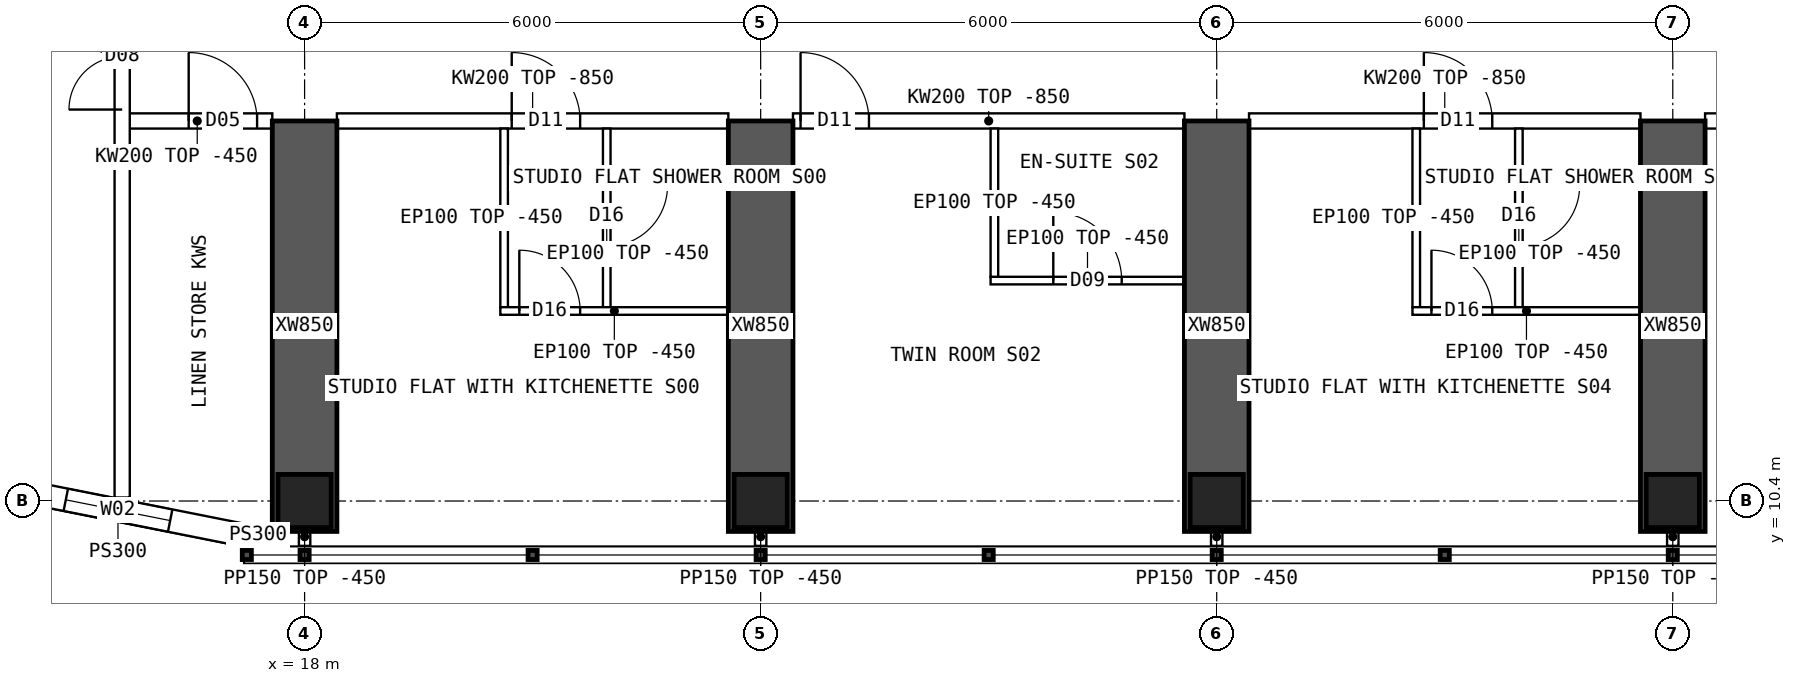
"""IFC4 building model, lengths in metres.
Left out: names, types, materials, properties, quantities, classifications, styles, units other than length and angle.
Written with IfcOpenShell. Run it as: python <this file> out.ifc"""

import sys

from ifc_helpers import new_model, si_unit, direction, frame, frame_2d, origin, origin_2d, place, context, subcontext, project, spatial, polyline, rectangle, hollow_rectangle, outline, extrude, element, fill, save


model = new_model("IFC4")
c1 = context("Model", 3, precision=1e-05, world=origin(), true_north=direction((0.0, 1.0)))
c2 = subcontext(c1, "Body", "Model", "MODEL_VIEW")
j1 = project(units=[si_unit("LENGTHUNIT", "METRE"), si_unit("PLANEANGLEUNIT", "RADIAN")], contexts=[c1])
p1 = place(None, origin())
s1 = spatial("IfcSite", under=j1, at=p1, CompositionType="ELEMENT")
p2 = place(p1, origin())
s2 = spatial("IfcBuilding", under=s1, at=p2, CompositionType="ELEMENT")
p3 = place(p2, frame((0.0, 0.0, 159.85)))
s3 = spatial("IfcBuildingStorey", under=s2, at=p3, CompositionType="ELEMENT", Elevation=159.85)
for number, where, z_axis, x_axis in (
    (1, (18.0, 10.4, 0.0), (0.0, 0.0, 1.0), (1.0, 0.0, 0.0)),
    (2, (24.0, 10.4, 0.0), (0.0, 0.0, 1.0), (1.0, 0.0, 0.0)),
    (3, (30.0, 10.4, 0.0), (0.0, 0.0, 1.0), (1.0, 0.0, 0.0)),
    (4, (36.0, 10.4, 0.0), (0.0, 0.0, 1.0), (1.0, 0.0, 0.0)),
):
    element("IfcColumn", number, at=place(p3, frame(where, z_axis=z_axis, x_axis=x_axis)), inside=s3, PredefinedType="COLUMN", context=c2, shape_type="SweptSolid", body=[
        extrude(hollow_rectangle(XDim=0.7, YDim=0.7, WallThickness=0.07, at=origin_2d()), origin(), (0.0, 0.0, 1.0), 3.75),
    ])
for number, where, z_axis, x_axis in (
    (5, (18.0, 10.0, 0.0), (0.0, 0.0, 1.0), (0.0, 1.0, 0.0)),
    (6, (24.0, 10.0, 0.0), (0.0, 0.0, 1.0), (0.0, 1.0, 0.0)),
    (7, (30.0, 10.0, 0.0), (0.0, 0.0, 1.0), (0.0, 1.0, 0.0)),
    (8, (36.0, 10.0, 0.0), (0.0, 0.0, 1.0), (0.0, 1.0, 0.0)),
):
    element("IfcWall", number, at=place(p3, frame(where, z_axis=z_axis, x_axis=x_axis)), inside=s3, PredefinedType="SHEAR", context=c2, shape_type="SweptSolid", body=[
        extrude(rectangle(XDim=5.4, YDim=0.85, at=frame_2d((2.7, 0.0))), origin(), (0.0, 0.0, 1.0), 3.75),
    ])
p4 = place(p3, frame((13.89, 10.608, 0.0), z_axis=(0.0, 0.0, 1.0), x_axis=(0.98078325777, -0.195100490205, 0.0)))
e9 = element("IfcWall", 9, at=p4, inside=s3, PredefinedType="SOLIDWALL", context=c2, shape_type="SweptSolid", body=[
    extrude(outline(polyline([(-0.03, -0.15), (3.405, -0.15), (3.345, 0.15), (0.03, 0.15), (-0.03, -0.15)])), origin(), (0.0, 0.0, 1.0), 3.3),
])
p5 = place(p4, frame((0.988, 0.0, 0.9)))
e10 = element("IfcOpeningElement", 10, at=p5, cuts=e9, PredefinedType="OPENING", context=c2, shape_type="SweptSolid", body=[
    extrude(rectangle(XDim=1.4, YDim=1.8, at=frame_2d((0.7, 0.9))), frame((0.0, 0.16, 0.0), z_axis=(0.0, -1.0, 0.0), x_axis=(1.0, 0.0, 0.0)), (0.0, 0.0, 1.0), 0.32),
])
p6 = place(p3, frame((17.2, 9.95, 0.0), z_axis=(0.0, 0.0, 1.0), x_axis=(1.0, 0.0, 0.0)))
e11 = element("IfcWall", 11, at=p6, inside=s3, PredefinedType="SOLIDWALL", context=c2, shape_type="SweptSolid", body=[
    extrude(rectangle(XDim=0.375, YDim=0.3, at=frame_2d((0.188, 0.0))), origin(), (0.0, 0.0, 1.0), 3.3),
])
p7 = place(p3, frame((15.6, 15.4, 0.0), z_axis=(0.0, 0.0, 1.0), x_axis=(1.0, 0.0, 0.0)))
e12 = element("IfcWall", 12, at=p7, inside=s3, PredefinedType="SOLIDWALL", context=c2, shape_type="SweptSolid", body=[
    extrude(rectangle(XDim=1.975, YDim=0.2, at=frame_2d((0.987, 0.0))), origin(), (0.0, 0.0, 1.0), 3.3),
])
p8 = place(p7, frame((0.875, 0.0, 0.0)))
e13 = element("IfcOpeningElement", 13, at=p8, cuts=e12, PredefinedType="OPENING", context=c2, shape_type="SweptSolid", body=[
    extrude(rectangle(XDim=0.9, YDim=2.1, at=frame_2d((0.45, 1.05))), frame((0.0, 0.11, 0.0), z_axis=(0.0, -1.0, 0.0), x_axis=(1.0, 0.0, 0.0)), (0.0, 0.0, 1.0), 0.22),
])
p9 = place(p3, frame((18.425, 15.4, 0.0), z_axis=(0.0, 0.0, 1.0), x_axis=(1.0, 0.0, 0.0)))
e14 = element("IfcWall", 14, at=p9, inside=s3, PredefinedType="SOLIDWALL", context=c2, shape_type="SweptSolid", body=[
    extrude(outline(polyline([(0.0, 0.0), (5.15, 0.0), (5.15, 2.9), (0.0, 2.9), (0.0, 0.0)])), frame((0.0, 0.1, 0.0), z_axis=(0.0, -1.0, 0.0), x_axis=(1.0, 0.0, 0.0)), (0.0, 0.0, 1.0), 0.2),
])
p10 = place(p9, frame((2.3, 0.0, 0.0)))
e15 = element("IfcOpeningElement", 15, at=p10, cuts=e14, PredefinedType="OPENING", context=c2, shape_type="SweptSolid", body=[
    extrude(rectangle(XDim=0.9, YDim=2.1, at=frame_2d((0.45, 1.05))), frame((0.0, 0.11, 0.0), z_axis=(0.0, -1.0, 0.0), x_axis=(1.0, 0.0, 0.0)), (0.0, 0.0, 1.0), 0.22),
])
p11 = place(p3, frame((24.425, 15.4, 0.0), z_axis=(0.0, 0.0, 1.0), x_axis=(1.0, 0.0, 0.0)))
e16 = element("IfcWall", 16, at=p11, inside=s3, PredefinedType="SOLIDWALL", context=c2, shape_type="SweptSolid", body=[
    extrude(outline(polyline([(0.0, 0.0), (5.15, 0.0), (5.15, 2.9), (0.0, 2.9), (0.0, 0.0)])), frame((0.0, 0.1, 0.0), z_axis=(0.0, -1.0, 0.0), x_axis=(1.0, 0.0, 0.0)), (0.0, 0.0, 1.0), 0.2),
])
p12 = place(p11, frame((0.1, 0.0, 0.0)))
e17 = element("IfcOpeningElement", 17, at=p12, cuts=e16, PredefinedType="OPENING", context=c2, shape_type="SweptSolid", body=[
    extrude(rectangle(XDim=0.9, YDim=2.1, at=frame_2d((0.45, 1.05))), frame((0.0, 0.11, 0.0), z_axis=(0.0, -1.0, 0.0), x_axis=(1.0, 0.0, 0.0)), (0.0, 0.0, 1.0), 0.22),
])
p13 = place(p3, frame((30.425, 15.4, 0.0), z_axis=(0.0, 0.0, 1.0), x_axis=(1.0, 0.0, 0.0)))
e18 = element("IfcWall", 18, at=p13, inside=s3, PredefinedType="SOLIDWALL", context=c2, shape_type="SweptSolid", body=[
    extrude(outline(polyline([(0.0, 0.0), (5.15, 0.0), (5.15, 2.9), (0.0, 2.9), (0.0, 0.0)])), frame((0.0, 0.1, 0.0), z_axis=(0.0, -1.0, 0.0), x_axis=(1.0, 0.0, 0.0)), (0.0, 0.0, 1.0), 0.2),
])
p14 = place(p13, frame((2.3, 0.0, 0.0)))
e19 = element("IfcOpeningElement", 19, at=p14, cuts=e18, PredefinedType="OPENING", context=c2, shape_type="SweptSolid", body=[
    extrude(rectangle(XDim=0.9, YDim=2.1, at=frame_2d((0.45, 1.05))), frame((0.0, 0.11, 0.0), z_axis=(0.0, -1.0, 0.0), x_axis=(1.0, 0.0, 0.0)), (0.0, 0.0, 1.0), 0.22),
])
p15 = place(p3, frame((36.425, 15.4, 0.0), z_axis=(0.0, 0.0, 1.0), x_axis=(1.0, 0.0, 0.0)))
e20 = element("IfcWall", 20, at=p15, inside=s3, PredefinedType="SOLIDWALL", context=c2, shape_type="SweptSolid", body=[
    extrude(outline(polyline([(0.0, 0.0), (5.15, 0.0), (5.15, 2.9), (0.0, 2.9), (0.0, 0.0)])), frame((0.0, 0.1, 0.0), z_axis=(0.0, -1.0, 0.0), x_axis=(1.0, 0.0, 0.0)), (0.0, 0.0, 1.0), 0.2),
])
p16 = place(p15, frame((0.3, 0.0, 0.0)))
e21 = element("IfcOpeningElement", 21, at=p16, cuts=e20, PredefinedType="OPENING", context=c2, shape_type="SweptSolid", body=[
    extrude(rectangle(XDim=1.0, YDim=2.1, at=frame_2d((0.5, 1.05))), frame((0.0, 0.11, 0.0), z_axis=(0.0, -1.0, 0.0), x_axis=(1.0, 0.0, 0.0)), (0.0, 0.0, 1.0), 0.22),
])
p17 = place(p3, frame((23.575, 12.9, 0.0), z_axis=(0.0, 0.0, 1.0), x_axis=(-1.0, 0.0, 0.0)))
e22 = element("IfcWall", 22, at=p17, inside=s3, PredefinedType="PARTITIONING", context=c2, shape_type="SweptSolid", body=[
    extrude(rectangle(XDim=3.0, YDim=0.1, at=frame_2d((1.5, 0.0))), origin(), (0.0, 0.0, 1.0), 3.3),
])
p18 = place(p17, frame((1.95, 0.0, 0.0)))
e23 = element("IfcOpeningElement", 23, at=p18, cuts=e22, PredefinedType="OPENING", context=c2, shape_type="SweptSolid", body=[
    extrude(rectangle(XDim=0.8, YDim=2.1, at=frame_2d((0.4, 1.05))), frame((0.0, 0.06, 0.0), z_axis=(0.0, -1.0, 0.0), x_axis=(1.0, 0.0, 0.0)), (0.0, 0.0, 1.0), 0.12),
])
p19 = place(p3, frame((20.625, 12.95, 0.0), z_axis=(0.0, 0.0, 1.0), x_axis=(0.0, 1.0, 0.0)))
e24 = element("IfcWall", 24, at=p19, inside=s3, PredefinedType="PARTITIONING", context=c2, shape_type="SweptSolid", body=[
    extrude(outline(polyline([(0.0, 0.0), (2.35, 0.0), (2.35, 2.9), (2.302, 2.9), (2.3, 3.3), (0.0, 3.3), (0.0, 0.0)])), frame((0.0, 0.05, 0.0), z_axis=(0.0, -1.0, 0.0), x_axis=(1.0, 0.0, 0.0)), (0.0, 0.0, 1.0), 0.1),
])
p20 = place(p3, frame((21.975, 12.95, 0.0), z_axis=(0.0, 0.0, 1.0), x_axis=(0.0, 1.0, 0.0)))
e25 = element("IfcWall", 25, at=p20, inside=s3, PredefinedType="PARTITIONING", context=c2, shape_type="SweptSolid", body=[
    extrude(outline(polyline([(0.0, 0.0), (2.35, 0.0), (2.35, 2.9), (2.302, 2.9), (2.3, 3.3), (0.0, 3.3), (0.0, 0.0)])), frame((0.0, 0.05, 0.0), z_axis=(0.0, -1.0, 0.0), x_axis=(1.0, 0.0, 0.0)), (0.0, 0.0, 1.0), 0.1),
])
p21 = place(p20, frame((0.8, 0.0, 0.0)))
e26 = element("IfcOpeningElement", 26, at=p21, cuts=e25, PredefinedType="OPENING", context=c2, shape_type="SweptSolid", body=[
    extrude(rectangle(XDim=0.8, YDim=2.1, at=frame_2d((0.4, 1.05))), frame((0.0, 0.06, 0.0), z_axis=(0.0, -1.0, 0.0), x_axis=(1.0, 0.0, 0.0)), (0.0, 0.0, 1.0), 0.12),
])
p22 = place(p3, frame((29.575, 13.3, 0.0), z_axis=(0.0, 0.0, 1.0), x_axis=(-1.0, 0.0, 0.0)))
e27 = element("IfcWall", 27, at=p22, inside=s3, PredefinedType="PARTITIONING", context=c2, shape_type="SweptSolid", body=[
    extrude(rectangle(XDim=2.55, YDim=0.1, at=frame_2d((1.275, 0.0))), origin(), (0.0, 0.0, 1.0), 3.3),
])
p23 = place(p22, frame((0.825, 0.0, 0.0)))
e28 = element("IfcOpeningElement", 28, at=p23, cuts=e27, PredefinedType="OPENING", context=c2, shape_type="SweptSolid", body=[
    extrude(rectangle(XDim=0.9, YDim=2.1, at=frame_2d((0.45, 1.05))), frame((0.0, 0.06, 0.0), z_axis=(0.0, -1.0, 0.0), x_axis=(1.0, 0.0, 0.0)), (0.0, 0.0, 1.0), 0.12),
])
p24 = place(p3, frame((27.075, 13.35, 0.0), z_axis=(0.0, 0.0, 1.0), x_axis=(0.0, 1.0, 0.0)))
e29 = element("IfcWall", 29, at=p24, inside=s3, PredefinedType="PARTITIONING", context=c2, shape_type="SweptSolid", body=[
    extrude(outline(polyline([(0.0, 0.0), (1.95, 0.0), (1.95, 2.9), (1.902, 2.9), (1.9, 3.3), (0.0, 3.3), (0.0, 0.0)])), frame((0.0, 0.05, 0.0), z_axis=(0.0, -1.0, 0.0), x_axis=(1.0, 0.0, 0.0)), (0.0, 0.0, 1.0), 0.1),
])
p25 = place(p3, frame((35.575, 12.9, 0.0), z_axis=(0.0, 0.0, 1.0), x_axis=(-1.0, 0.0, 0.0)))
e30 = element("IfcWall", 30, at=p25, inside=s3, PredefinedType="PARTITIONING", context=c2, shape_type="SweptSolid", body=[
    extrude(rectangle(XDim=3.0, YDim=0.1, at=frame_2d((1.5, 0.0))), origin(), (0.0, 0.0, 1.0), 3.3),
])
p26 = place(p25, frame((1.95, 0.0, 0.0)))
e31 = element("IfcOpeningElement", 31, at=p26, cuts=e30, PredefinedType="OPENING", context=c2, shape_type="SweptSolid", body=[
    extrude(rectangle(XDim=0.8, YDim=2.1, at=frame_2d((0.4, 1.05))), frame((0.0, 0.06, 0.0), z_axis=(0.0, -1.0, 0.0), x_axis=(1.0, 0.0, 0.0)), (0.0, 0.0, 1.0), 0.12),
])
p27 = place(p3, frame((32.625, 12.95, 0.0), z_axis=(0.0, 0.0, 1.0), x_axis=(0.0, 1.0, 0.0)))
e32 = element("IfcWall", 32, at=p27, inside=s3, PredefinedType="PARTITIONING", context=c2, shape_type="SweptSolid", body=[
    extrude(outline(polyline([(0.0, 0.0), (2.35, 0.0), (2.35, 2.9), (2.302, 2.9), (2.3, 3.3), (0.0, 3.3), (0.0, 0.0)])), frame((0.0, 0.05, 0.0), z_axis=(0.0, -1.0, 0.0), x_axis=(1.0, 0.0, 0.0)), (0.0, 0.0, 1.0), 0.1),
])
p28 = place(p3, frame((33.975, 12.95, 0.0), z_axis=(0.0, 0.0, 1.0), x_axis=(0.0, 1.0, 0.0)))
e33 = element("IfcWall", 33, at=p28, inside=s3, PredefinedType="PARTITIONING", context=c2, shape_type="SweptSolid", body=[
    extrude(outline(polyline([(0.0, 0.0), (2.35, 0.0), (2.35, 2.9), (2.302, 2.9), (2.3, 3.3), (0.0, 3.3), (0.0, 0.0)])), frame((0.0, 0.05, 0.0), z_axis=(0.0, -1.0, 0.0), x_axis=(1.0, 0.0, 0.0)), (0.0, 0.0, 1.0), 0.1),
])
p29 = place(p28, frame((0.8, 0.0, 0.0)))
e34 = element("IfcOpeningElement", 34, at=p29, cuts=e33, PredefinedType="OPENING", context=c2, shape_type="SweptSolid", body=[
    extrude(rectangle(XDim=0.8, YDim=2.1, at=frame_2d((0.4, 1.05))), frame((0.0, 0.06, 0.0), z_axis=(0.0, -1.0, 0.0), x_axis=(1.0, 0.0, 0.0)), (0.0, 0.0, 1.0), 0.12),
])
p30 = place(p3, frame((15.6, 10.446, 0.0), z_axis=(0.0, 0.0, 1.0), x_axis=(0.0, 1.0, 0.0)))
e35 = element("IfcWall", 35, at=p30, inside=s3, PredefinedType="SOLIDWALL", context=c2, shape_type="SweptSolid", body=[
    extrude(rectangle(XDim=43.107, YDim=0.2, at=frame_2d((21.554, 0.0))), origin(), (0.0, 0.0, 1.0), 3.3),
])
p31 = place(p30, frame((13.914, 0.0, 0.0)))
e36 = element("IfcOpeningElement", 36, at=p31, cuts=e35, PredefinedType="OPENING", context=c2, shape_type="SweptSolid", body=[
    extrude(rectangle(XDim=1.2, YDim=2.1, at=frame_2d((0.6, 1.05))), frame((0.0, 0.11, 0.0), z_axis=(0.0, -1.0, 0.0), x_axis=(1.0, 0.0, 0.0)), (0.0, 0.0, 1.0), 0.22),
])
p32 = place(p30, frame((27.994, 0.0, 0.0)))
e37 = element("IfcOpeningElement", 37, at=p32, cuts=e35, PredefinedType="OPENING", context=c2, shape_type="SweptSolid", body=[
    extrude(rectangle(XDim=1.2, YDim=2.1, at=frame_2d((0.6, 1.05))), frame((0.0, 0.11, 0.0), z_axis=(0.0, -1.0, 0.0), x_axis=(1.0, 0.0, 0.0)), (0.0, 0.0, 1.0), 0.22),
])
p33 = place(p30, frame((5.104, 0.0, 0.0)))
e38 = element("IfcOpeningElement", 38, at=p33, cuts=e35, PredefinedType="OPENING", context=c2, shape_type="SweptSolid", body=[
    extrude(rectangle(XDim=1.4, YDim=2.1, at=frame_2d((0.7, 1.05))), frame((0.0, 0.11, 0.0), z_axis=(0.0, -1.0, 0.0), x_axis=(1.0, 0.0, 0.0)), (0.0, 0.0, 1.0), 0.22),
])
p34 = place(p30, frame((36.504, 0.0, 0.0)))
e39 = element("IfcOpeningElement", 39, at=p34, cuts=e35, PredefinedType="OPENING", context=c2, shape_type="SweptSolid", body=[
    extrude(rectangle(XDim=1.4, YDim=2.1, at=frame_2d((0.7, 1.05))), frame((0.0, 0.11, 0.0), z_axis=(0.0, -1.0, 0.0), x_axis=(1.0, 0.0, 0.0)), (0.0, 0.0, 1.0), 0.22),
])
for number, where, z_axis, x_axis in (
    (40, (18.0, 10.05, 0.0), (0.0, 0.0, 1.0), (0.0, -1.0, 0.0)),
    (41, (24.0, 10.05, 0.0), (0.0, 0.0, 1.0), (0.0, -1.0, 0.0)),
    (42, (30.0, 10.05, 0.0), (0.0, 0.0, 1.0), (0.0, -1.0, 0.0)),
    (43, (36.0, 10.05, 0.0), (0.0, 0.0, 1.0), (0.0, -1.0, 0.0)),
):
    element("IfcWall", number, at=place(p3, frame(where, z_axis=z_axis, x_axis=x_axis)), inside=s3, PredefinedType="PARTITIONING", context=c2, shape_type="SweptSolid", body=[
        extrude(rectangle(XDim=0.24, YDim=0.15, at=frame_2d((0.12, 0.0))), origin(), (0.0, 0.0, 1.0), 3.3),
    ])
p35 = place(p5, origin())
e44 = element("IfcWindow", 44, at=p35, inside=s3, PartitioningType="SINGLE_PANEL", PredefinedType="WINDOW", context=c2, shape_type="SweptSolid", body=[
    extrude(rectangle(XDim=1.4, YDim=1.8, at=frame_2d((0.7, 0.9))), frame((0.0, 0.03, 0.0), z_axis=(0.0, -1.0, 0.0), x_axis=(1.0, 0.0, 0.0)), (0.0, 0.0, 1.0), 0.06),
])
fill(e10, e44)
p36 = place(p18, origin())
e45 = element("IfcDoor", 45, at=p36, inside=s3, OperationType="SINGLE_SWING_RIGHT", PredefinedType="DOOR", context=c2, shape_type="SweptSolid", body=[
    extrude(rectangle(XDim=0.8, YDim=2.1, at=frame_2d((0.4, 1.05))), frame((0.0, 0.025, 0.0), z_axis=(0.0, -1.0, 0.0), x_axis=(1.0, 0.0, 0.0)), (0.0, 0.0, 1.0), 0.05),
])
fill(e23, e45)
p37 = place(p21, origin())
e46 = element("IfcDoor", 46, at=p37, inside=s3, OperationType="SINGLE_SWING_RIGHT", PredefinedType="DOOR", context=c2, shape_type="SweptSolid", body=[
    extrude(rectangle(XDim=0.8, YDim=2.1, at=frame_2d((0.4, 1.05))), frame((0.0, 0.025, 0.0), z_axis=(0.0, -1.0, 0.0), x_axis=(1.0, 0.0, 0.0)), (0.0, 0.0, 1.0), 0.05),
])
fill(e26, e46)
p38 = place(p10, origin())
e47 = element("IfcDoor", 47, at=p38, inside=s3, OperationType="SINGLE_SWING_LEFT", PredefinedType="DOOR", context=c2, shape_type="SweptSolid", body=[
    extrude(rectangle(XDim=0.9, YDim=2.1, at=frame_2d((0.45, 1.05))), frame((0.0, 0.025, 0.0), z_axis=(0.0, -1.0, 0.0), x_axis=(1.0, 0.0, 0.0)), (0.0, 0.0, 1.0), 0.05),
])
fill(e15, e47)
p39 = place(p23, origin())
e48 = element("IfcDoor", 48, at=p39, inside=s3, OperationType="SINGLE_SWING_RIGHT", PredefinedType="DOOR", context=c2, shape_type="SweptSolid", body=[
    extrude(rectangle(XDim=0.9, YDim=2.1, at=frame_2d((0.45, 1.05))), frame((0.0, 0.025, 0.0), z_axis=(0.0, -1.0, 0.0), x_axis=(1.0, 0.0, 0.0)), (0.0, 0.0, 1.0), 0.05),
])
fill(e28, e48)
p40 = place(p12, origin())
e49 = element("IfcDoor", 49, at=p40, inside=s3, OperationType="SINGLE_SWING_LEFT", PredefinedType="DOOR", context=c2, shape_type="SweptSolid", body=[
    extrude(rectangle(XDim=0.9, YDim=2.1, at=frame_2d((0.45, 1.05))), frame((0.0, 0.025, 0.0), z_axis=(0.0, -1.0, 0.0), x_axis=(1.0, 0.0, 0.0)), (0.0, 0.0, 1.0), 0.05),
])
fill(e17, e49)
p41 = place(p26, origin())
e50 = element("IfcDoor", 50, at=p41, inside=s3, OperationType="SINGLE_SWING_RIGHT", PredefinedType="DOOR", context=c2, shape_type="SweptSolid", body=[
    extrude(rectangle(XDim=0.8, YDim=2.1, at=frame_2d((0.4, 1.05))), frame((0.0, 0.025, 0.0), z_axis=(0.0, -1.0, 0.0), x_axis=(1.0, 0.0, 0.0)), (0.0, 0.0, 1.0), 0.05),
])
fill(e31, e50)
p42 = place(p29, origin())
e51 = element("IfcDoor", 51, at=p42, inside=s3, OperationType="SINGLE_SWING_RIGHT", PredefinedType="DOOR", context=c2, shape_type="SweptSolid", body=[
    extrude(rectangle(XDim=0.8, YDim=2.1, at=frame_2d((0.4, 1.05))), frame((0.0, 0.025, 0.0), z_axis=(0.0, -1.0, 0.0), x_axis=(1.0, 0.0, 0.0)), (0.0, 0.0, 1.0), 0.05),
])
fill(e34, e51)
p43 = place(p14, origin())
e52 = element("IfcDoor", 52, at=p43, inside=s3, OperationType="SINGLE_SWING_LEFT", PredefinedType="DOOR", context=c2, shape_type="SweptSolid", body=[
    extrude(rectangle(XDim=0.9, YDim=2.1, at=frame_2d((0.45, 1.05))), frame((0.0, 0.025, 0.0), z_axis=(0.0, -1.0, 0.0), x_axis=(1.0, 0.0, 0.0)), (0.0, 0.0, 1.0), 0.05),
])
fill(e19, e52)
p44 = place(p33, origin())
e53 = element("IfcDoor", 53, at=p44, inside=s3, OperationType="DOUBLE_DOOR_SINGLE_SWING", PredefinedType="DOOR", context=c2, shape_type="SweptSolid", body=[
    extrude(rectangle(XDim=1.4, YDim=2.1, at=frame_2d((0.7, 1.05))), frame((0.0, 0.025, 0.0), z_axis=(0.0, -1.0, 0.0), x_axis=(1.0, 0.0, 0.0)), (0.0, 0.0, 1.0), 0.05),
])
fill(e38, e53)
p45 = place(p8, origin())
e54 = element("IfcDoor", 54, at=p45, inside=s3, OperationType="SINGLE_SWING_LEFT", PredefinedType="DOOR", context=c2, shape_type="SweptSolid", body=[
    extrude(rectangle(XDim=0.9, YDim=2.1, at=frame_2d((0.45, 1.05))), frame((0.0, 0.025, 0.0), z_axis=(0.0, -1.0, 0.0), x_axis=(1.0, 0.0, 0.0)), (0.0, 0.0, 1.0), 0.05),
])
fill(e13, e54)
save(model, sys.argv[1])
